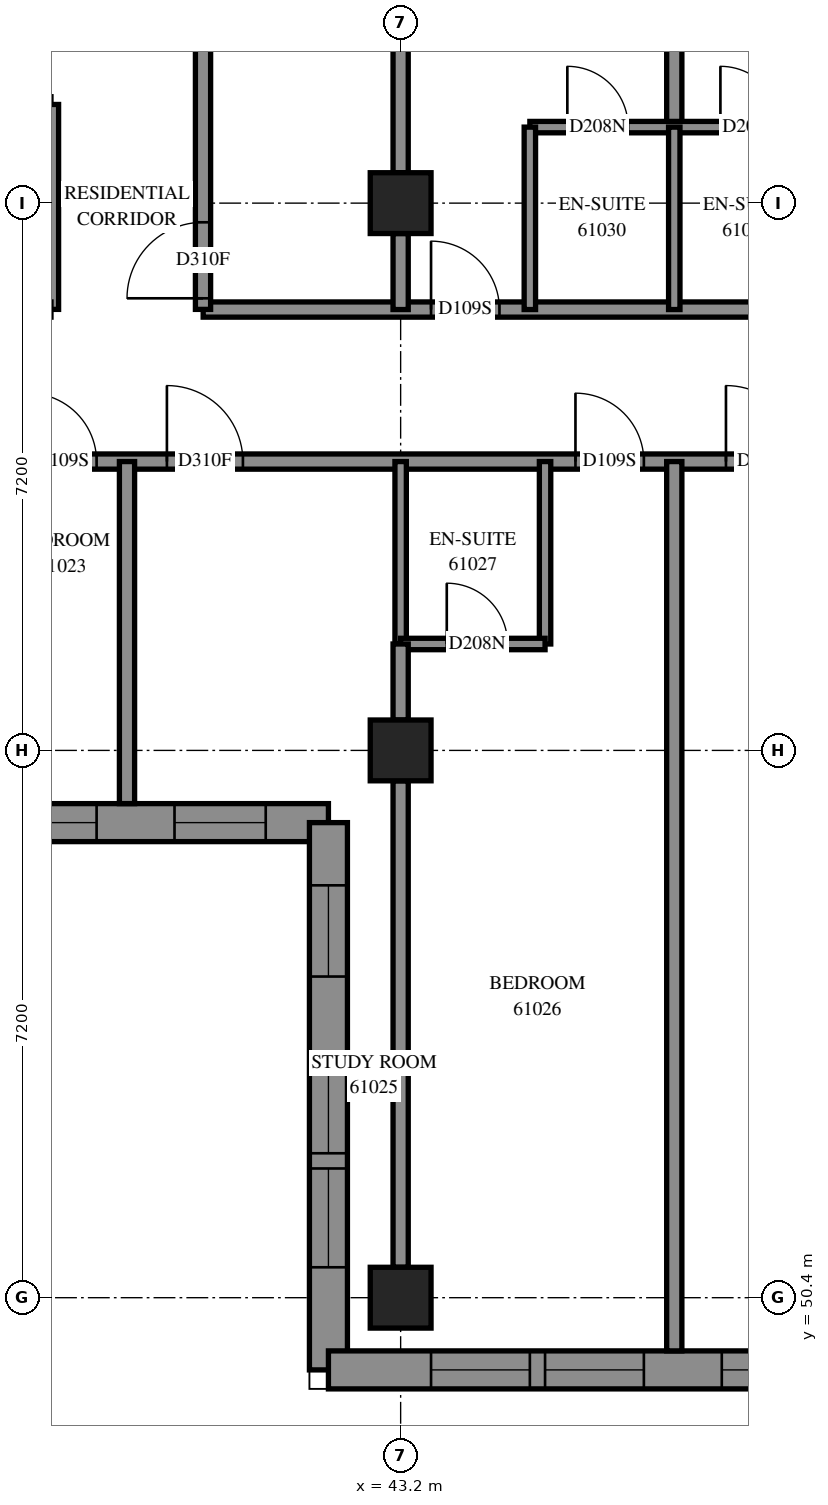
"""IFC4 building model, lengths in metres.
Left out: names, types, materials, properties, quantities, classifications, styles, units other than length and angle.
Written with IfcOpenShell. Run it as: python <this file> out.ifc"""

import sys

from ifc_helpers import new_model, si_unit, direction, frame, frame_2d, origin, origin_2d, place, context, subcontext, project, spatial, polyline, rectangle, outline, extrude, element, fill, save


model = new_model("IFC4")
c1 = context("Model", 3, precision=1e-05, world=origin(), true_north=direction((0.0, 1.0)))
c2 = subcontext(c1, "Body", "Model", "MODEL_VIEW")
j1 = project(units=[si_unit("LENGTHUNIT", "METRE"), si_unit("PLANEANGLEUNIT", "RADIAN")], contexts=[c1])
p1 = place(None, origin())
s1 = spatial("IfcSite", under=j1, at=p1, CompositionType="ELEMENT")
p2 = place(p1, origin())
s2 = spatial("IfcBuilding", under=s1, at=p2, CompositionType="ELEMENT")
p3 = place(p2, frame((0.0, 0.0, 223.6)))
s3 = spatial("IfcBuildingStorey", under=s2, at=p3, CompositionType="ELEMENT", Elevation=223.6)
for number, where, z_axis, x_axis in (
    (1, (43.2, 50.4, 0.0), (0.0, 0.0, 1.0), (1.0, 0.0, 0.0)),
    (2, (43.2, 57.6, 0.0), (0.0, 0.0, 1.0), (1.0, 0.0, 0.0)),
    (3, (43.2, 64.8, 0.0), (0.0, 0.0, 1.0), (1.0, 0.0, 0.0)),
):
    element("IfcColumn", number, at=place(p3, frame(where, z_axis=z_axis, x_axis=x_axis)), inside=s3, PredefinedType="COLUMN", context=c2, shape_type="SweptSolid", body=[
        extrude(rectangle(XDim=0.8, YDim=0.8, at=origin_2d()), origin(), (0.0, 0.0, 1.0), 3.1),
    ])
p4 = place(p3, frame((35.05, 56.65, 0.0), z_axis=(0.0, 0.0, 1.0), x_axis=(1.0, 0.0, 0.0)))
e4 = element("IfcWall", 4, at=p4, inside=s3, PredefinedType="SOLIDWALL", context=c2, shape_type="SweptSolid", body=[
    extrude(outline(polyline([(-0.25, -0.25), (6.95, -0.25), (7.45, 0.25), (0.25, 0.25), (-0.25, -0.25)])), origin(), (0.0, 0.0, 1.0), 3.1),
])
p5 = place(p4, frame((1.35, 0.0, 0.45)))
e5 = element("IfcOpeningElement", 5, at=p5, cuts=e4, PredefinedType="OPENING", context=c2, shape_type="SweptSolid", body=[
    extrude(rectangle(XDim=1.3, YDim=2.5, at=frame_2d((0.65, 1.25))), frame((0.0, 0.26, 0.0), z_axis=(0.0, -1.0, 0.0), x_axis=(1.0, 0.0, 0.0)), (0.0, 0.0, 1.0), 0.52),
])
p6 = place(p4, frame((2.85, 0.0, 0.45)))
e6 = element("IfcOpeningElement", 6, at=p6, cuts=e4, PredefinedType="OPENING", context=c2, shape_type="SweptSolid", body=[
    extrude(rectangle(XDim=1.3, YDim=2.5, at=frame_2d((0.65, 1.25))), frame((0.0, 0.26, 0.0), z_axis=(0.0, -1.0, 0.0), x_axis=(1.0, 0.0, 0.0)), (0.0, 0.0, 1.0), 0.52),
])
p7 = place(p4, frame((5.175, 0.0, 0.45)))
e7 = element("IfcOpeningElement", 7, at=p7, cuts=e4, PredefinedType="OPENING", context=c2, shape_type="SweptSolid", body=[
    extrude(rectangle(XDim=1.2, YDim=2.5, at=frame_2d((0.6, 1.25))), frame((0.0, 0.26, 0.0), z_axis=(0.0, -1.0, 0.0), x_axis=(1.0, 0.0, 0.0)), (0.0, 0.0, 1.0), 0.52),
])
p8 = place(p3, frame((42.25, 56.65, 0.0), z_axis=(0.0, 0.0, 1.0), x_axis=(0.0, -1.0, 0.0)))
e8 = element("IfcWall", 8, at=p8, inside=s3, PredefinedType="SOLIDWALL", context=c2, shape_type="SweptSolid", body=[
    extrude(outline(polyline([(0.25, -0.25), (7.45, -0.25), (6.95, 0.25), (-0.25, 0.25), (0.25, -0.25)])), origin(), (0.0, 0.0, 1.0), 3.1),
])
p9 = place(p8, frame((3.05, 0.0, 0.45)))
e9 = element("IfcOpeningElement", 9, at=p9, cuts=e8, PredefinedType="OPENING", context=c2, shape_type="SweptSolid", body=[
    extrude(rectangle(XDim=1.3, YDim=2.5, at=frame_2d((0.65, 1.25))), frame((0.0, 0.26, 0.0), z_axis=(0.0, -1.0, 0.0), x_axis=(1.0, 0.0, 0.0)), (0.0, 0.0, 1.0), 0.52),
])
p10 = place(p8, frame((4.55, 0.0, 0.45)))
e10 = element("IfcOpeningElement", 10, at=p10, cuts=e8, PredefinedType="OPENING", context=c2, shape_type="SweptSolid", body=[
    extrude(rectangle(XDim=1.3, YDim=2.5, at=frame_2d((0.65, 1.25))), frame((0.0, 0.26, 0.0), z_axis=(0.0, -1.0, 0.0), x_axis=(1.0, 0.0, 0.0)), (0.0, 0.0, 1.0), 0.52),
])
p11 = place(p8, frame((0.825, 0.0, 0.45)))
e11 = element("IfcOpeningElement", 11, at=p11, cuts=e8, PredefinedType="OPENING", context=c2, shape_type="SweptSolid", body=[
    extrude(rectangle(XDim=1.2, YDim=2.5, at=frame_2d((0.6, 1.25))), frame((0.0, 0.26, 0.0), z_axis=(0.0, -1.0, 0.0), x_axis=(1.0, 0.0, 0.0)), (0.0, 0.0, 1.0), 0.52),
])
p12 = place(p3, frame((42.25, 49.45, 0.0), z_axis=(0.0, 0.0, 1.0), x_axis=(1.0, 0.0, 0.0)))
e12 = element("IfcWall", 12, at=p12, inside=s3, PredefinedType="SOLIDWALL", context=c2, shape_type="SweptSolid", body=[
    extrude(outline(polyline([(-0.25, -0.25), (6.95, -0.25), (7.45, 0.25), (0.25, 0.25), (-0.25, -0.25)])), origin(), (0.0, 0.0, 1.0), 3.1),
])
p13 = place(p12, frame((1.35, 0.0, 0.45)))
e13 = element("IfcOpeningElement", 13, at=p13, cuts=e12, PredefinedType="OPENING", context=c2, shape_type="SweptSolid", body=[
    extrude(rectangle(XDim=1.3, YDim=2.5, at=frame_2d((0.65, 1.25))), frame((0.0, 0.26, 0.0), z_axis=(0.0, -1.0, 0.0), x_axis=(1.0, 0.0, 0.0)), (0.0, 0.0, 1.0), 0.52),
])
p14 = place(p12, frame((2.85, 0.0, 0.45)))
e14 = element("IfcOpeningElement", 14, at=p14, cuts=e12, PredefinedType="OPENING", context=c2, shape_type="SweptSolid", body=[
    extrude(rectangle(XDim=1.3, YDim=2.5, at=frame_2d((0.65, 1.25))), frame((0.0, 0.26, 0.0), z_axis=(0.0, -1.0, 0.0), x_axis=(1.0, 0.0, 0.0)), (0.0, 0.0, 1.0), 0.52),
])
p15 = place(p12, frame((5.175, 0.0, 0.45)))
e15 = element("IfcOpeningElement", 15, at=p15, cuts=e12, PredefinedType="OPENING", context=c2, shape_type="SweptSolid", body=[
    extrude(rectangle(XDim=1.2, YDim=2.5, at=frame_2d((0.6, 1.25))), frame((0.0, 0.26, 0.0), z_axis=(0.0, -1.0, 0.0), x_axis=(1.0, 0.0, 0.0)), (0.0, 0.0, 1.0), 0.52),
])
p16 = place(p3, frame((36.0, 61.4, 0.0), z_axis=(0.0, 0.0, 1.0), x_axis=(1.0, 0.0, 0.0)))
e16 = element("IfcWall", 16, at=p16, inside=s3, PredefinedType="PARTITIONING", context=c2, shape_type="SweptSolid", body=[
    extrude(rectangle(XDim=17.0, YDim=0.2, at=frame_2d((8.5, 0.0))), origin(), (0.0, 0.0, 1.0), 3.1),
])
p17 = place(p16, frame((2.3, 0.0, 0.0)))
e17 = element("IfcOpeningElement", 17, at=p17, cuts=e16, PredefinedType="OPENING", context=c2, shape_type="SweptSolid", body=[
    extrude(rectangle(XDim=0.9, YDim=2.1, at=frame_2d((0.45, 1.05))), frame((0.0, 0.11, 0.0), z_axis=(0.0, -1.0, 0.0), x_axis=(1.0, 0.0, 0.0)), (0.0, 0.0, 1.0), 0.22),
])
p18 = place(p16, frame((4.125, 0.0, 0.0)))
e18 = element("IfcOpeningElement", 18, at=p18, cuts=e16, PredefinedType="OPENING", context=c2, shape_type="SweptSolid", body=[
    extrude(rectangle(XDim=1.0, YDim=2.1, at=frame_2d((0.5, 1.05))), frame((0.0, 0.11, 0.0), z_axis=(0.0, -1.0, 0.0), x_axis=(1.0, 0.0, 0.0)), (0.0, 0.0, 1.0), 0.22),
])
p19 = place(p16, frame((9.5, 0.0, 0.0)))
e19 = element("IfcOpeningElement", 19, at=p19, cuts=e16, PredefinedType="OPENING", context=c2, shape_type="SweptSolid", body=[
    extrude(rectangle(XDim=0.9, YDim=2.1, at=frame_2d((0.45, 1.05))), frame((0.0, 0.11, 0.0), z_axis=(0.0, -1.0, 0.0), x_axis=(1.0, 0.0, 0.0)), (0.0, 0.0, 1.0), 0.22),
])
p20 = place(p16, frame((11.48, 0.0, 0.0)))
e20 = element("IfcOpeningElement", 20, at=p20, cuts=e16, PredefinedType="OPENING", context=c2, shape_type="SweptSolid", body=[
    extrude(rectangle(XDim=1.0, YDim=2.1, at=frame_2d((0.5, 1.05))), frame((0.0, 0.11, 0.0), z_axis=(0.0, -1.0, 0.0), x_axis=(1.0, 0.0, 0.0)), (0.0, 0.0, 1.0), 0.22),
])
p21 = place(p16, frame((15.805, 0.0, 0.0)))
e21 = element("IfcOpeningElement", 21, at=p21, cuts=e16, PredefinedType="OPENING", context=c2, shape_type="SweptSolid", body=[
    extrude(rectangle(XDim=1.0, YDim=2.1, at=frame_2d((0.5, 1.05))), frame((0.0, 0.11, 0.0), z_axis=(0.0, -1.0, 0.0), x_axis=(1.0, 0.0, 0.0)), (0.0, 0.0, 1.0), 0.22),
])
p22 = place(p3, frame((40.602, 63.4, 0.0), z_axis=(0.0, 0.0, 1.0), x_axis=(1.0, 0.0, 0.0)))
e22 = element("IfcWall", 22, at=p22, inside=s3, PredefinedType="PARTITIONING", context=c2, shape_type="SweptSolid", body=[
    extrude(rectangle(XDim=14.398, YDim=0.2, at=frame_2d((7.199, 0.0))), origin(), (0.0, 0.0, 1.0), 3.1),
])
p23 = place(p22, frame((2.998, 0.0, 0.0)))
e23 = element("IfcOpeningElement", 23, at=p23, cuts=e22, PredefinedType="OPENING", context=c2, shape_type="SweptSolid", body=[
    extrude(rectangle(XDim=0.9, YDim=2.1, at=frame_2d((0.45, 1.05))), frame((0.0, 0.11, 0.0), z_axis=(0.0, -1.0, 0.0), x_axis=(1.0, 0.0, 0.0)), (0.0, 0.0, 1.0), 0.22),
])
p24 = place(p22, frame((8.498, 0.0, 0.0)))
e24 = element("IfcOpeningElement", 24, at=p24, cuts=e22, PredefinedType="OPENING", context=c2, shape_type="SweptSolid", body=[
    extrude(rectangle(XDim=0.9, YDim=2.1, at=frame_2d((0.45, 1.05))), frame((0.0, 0.11, 0.0), z_axis=(0.0, -1.0, 0.0), x_axis=(1.0, 0.0, 0.0)), (0.0, 0.0, 1.0), 0.22),
])
p25 = place(p22, frame((10.198, 0.0, 0.0)))
e25 = element("IfcOpeningElement", 25, at=p25, cuts=e22, PredefinedType="OPENING", context=c2, shape_type="SweptSolid", body=[
    extrude(rectangle(XDim=0.9, YDim=2.1, at=frame_2d((0.45, 1.05))), frame((0.0, 0.11, 0.0), z_axis=(0.0, -1.0, 0.0), x_axis=(1.0, 0.0, 0.0)), (0.0, 0.0, 1.0), 0.22),
])
p26 = place(p3, frame((46.8, 49.7, 0.0), z_axis=(0.0, 0.0, 1.0), x_axis=(0.0, 1.0, 0.0)))
e26 = element("IfcWall", 26, at=p26, inside=s3, PredefinedType="PARTITIONING", context=c2, shape_type="SweptSolid", body=[
    extrude(rectangle(XDim=11.7, YDim=0.2, at=frame_2d((5.85, 0.0))), origin(), (0.0, 0.0, 1.0), 3.1),
])
p27 = place(p3, frame((46.8, 65.8, 0.0), z_axis=(0.0, 0.0, 1.0), x_axis=(0.0, 1.0, 0.0)))
e27 = element("IfcWall", 27, at=p27, inside=s3, PredefinedType="PARTITIONING", context=c2, shape_type="SweptSolid", body=[
    extrude(rectangle(XDim=7.08, YDim=0.2, at=frame_2d((3.54, 0.0))), origin(), (0.0, 0.0, 1.0), 3.1),
])
p28 = place(p3, frame((43.2, 50.8, 0.0), z_axis=(0.0, 0.0, 1.0), x_axis=(0.0, 1.0, 0.0)))
e28 = element("IfcWall", 28, at=p28, inside=s3, PredefinedType="PARTITIONING", context=c2, shape_type="SweptSolid", body=[
    extrude(rectangle(XDim=6.4, YDim=0.2, at=frame_2d((3.2, 0.0))), origin(), (0.0, 0.0, 1.0), 2.6),
])
p29 = place(p3, frame((43.2, 65.2, 0.0), z_axis=(0.0, 0.0, 1.0), x_axis=(0.0, 1.0, 0.0)))
e29 = element("IfcWall", 29, at=p29, inside=s3, PredefinedType="PARTITIONING", context=c2, shape_type="SweptSolid", body=[
    extrude(rectangle(XDim=6.4, YDim=0.2, at=frame_2d((3.2, 0.0))), origin(), (0.0, 0.0, 1.0), 3.1),
])
p30 = place(p3, frame((40.6, 63.402, 0.0), z_axis=(0.0, 0.0, 1.0), x_axis=(0.0, 1.0, 0.0)))
e30 = element("IfcWall", 30, at=p30, inside=s3, PredefinedType="PARTITIONING", context=c2, shape_type="SweptSolid", body=[
    extrude(rectangle(XDim=4.698, YDim=0.2, at=frame_2d((2.349, 0.0))), origin(), (0.0, 0.0, 1.0), 3.1),
])
p31 = place(p30, frame((0.146, 0.0, 0.0)))
e31 = element("IfcOpeningElement", 31, at=p31, cuts=e30, PredefinedType="OPENING", context=c2, shape_type="SweptSolid", body=[
    extrude(rectangle(XDim=1.0, YDim=2.1, at=frame_2d((0.5, 1.05))), frame((0.0, 0.11, 0.0), z_axis=(0.0, -1.0, 0.0), x_axis=(1.0, 0.0, 0.0)), (0.0, 0.0, 1.0), 0.22),
])
p32 = place(p3, frame((39.6, 56.9, 0.0), z_axis=(0.0, 0.0, 1.0), x_axis=(0.0, 1.0, 0.0)))
e32 = element("IfcWall", 32, at=p32, inside=s3, PredefinedType="PARTITIONING", context=c2, shape_type="SweptSolid", body=[
    extrude(rectangle(XDim=4.5, YDim=0.2, at=frame_2d((2.25, 0.0))), origin(), (0.0, 0.0, 1.0), 3.1),
])
p33 = place(p3, frame((44.9, 65.8, 0.0), z_axis=(0.0, 0.0, 1.0), x_axis=(1.0, 0.0, 0.0)))
e33 = element("IfcWall", 33, at=p33, inside=s3, PredefinedType="PARTITIONING", context=c2, shape_type="SweptSolid", body=[
    extrude(rectangle(XDim=3.8, YDim=0.15, at=frame_2d((1.9, 0.0))), origin(), (0.0, 0.0, 1.0), 3.1),
])
p34 = place(p33, frame((0.493, 0.0, 0.0)))
e34 = element("IfcOpeningElement", 34, at=p34, cuts=e33, PredefinedType="OPENING", context=c2, shape_type="SweptSolid", body=[
    extrude(rectangle(XDim=0.8, YDim=2.1, at=frame_2d((0.4, 1.05))), frame((0.0, 0.085, 0.0), z_axis=(0.0, -1.0, 0.0), x_axis=(1.0, 0.0, 0.0)), (0.0, 0.0, 1.0), 0.17),
])
p35 = place(p33, frame((2.507, 0.0, 0.0)))
e35 = element("IfcOpeningElement", 35, at=p35, cuts=e33, PredefinedType="OPENING", context=c2, shape_type="SweptSolid", body=[
    extrude(rectangle(XDim=0.8, YDim=2.1, at=frame_2d((0.4, 1.05))), frame((0.0, 0.085, 0.0), z_axis=(0.0, -1.0, 0.0), x_axis=(1.0, 0.0, 0.0)), (0.0, 0.0, 1.0), 0.17),
])
p36 = place(p3, frame((38.6, 63.402, 0.0), z_axis=(0.0, 0.0, 1.0), x_axis=(0.0, 1.0, 0.0)))
e36 = element("IfcWall", 36, at=p36, inside=s3, PredefinedType="PARTITIONING", context=c2, shape_type="SweptSolid", body=[
    extrude(rectangle(XDim=2.696, YDim=0.2, at=frame_2d((1.348, 0.0))), origin(), (0.0, 0.0, 1.0), 3.1),
])
for number, where, z_axis, x_axis in (
    (37, (45.1, 59.0, 0.0), (0.0, 0.0, 1.0), (0.0, 1.0, 0.0)),
    (38, (43.2, 59.0, 0.0), (0.0, 0.0, 1.0), (0.0, 1.0, 0.0)),
    (39, (44.9, 63.4, 0.0), (0.0, 0.0, 1.0), (0.0, 1.0, 0.0)),
    (40, (46.8, 63.4, 0.0), (0.0, 0.0, 1.0), (0.0, 1.0, 0.0)),
):
    element("IfcWall", number, at=place(p3, frame(where, z_axis=z_axis, x_axis=x_axis)), inside=s3, PredefinedType="PARTITIONING", context=c2, shape_type="SweptSolid", body=[
        extrude(rectangle(XDim=2.4, YDim=0.15, at=frame_2d((1.2, 0.0))), origin(), (0.0, 0.0, 1.0), 3.1),
    ])
p37 = place(p3, frame((43.2, 59.0, 0.0), z_axis=(0.0, 0.0, 1.0), x_axis=(1.0, 0.0, 0.0)))
e41 = element("IfcWall", 41, at=p37, inside=s3, PredefinedType="PARTITIONING", context=c2, shape_type="SweptSolid", body=[
    extrude(rectangle(XDim=1.9, YDim=0.15, at=frame_2d((0.95, 0.0))), origin(), (0.0, 0.0, 1.0), 3.1),
])
p38 = place(p37, frame((0.607, 0.0, 0.0)))
e42 = element("IfcOpeningElement", 42, at=p38, cuts=e41, PredefinedType="OPENING", context=c2, shape_type="SweptSolid", body=[
    extrude(rectangle(XDim=0.8, YDim=2.1, at=frame_2d((0.4, 1.05))), frame((0.0, 0.085, 0.0), z_axis=(0.0, -1.0, 0.0), x_axis=(1.0, 0.0, 0.0)), (0.0, 0.0, 1.0), 0.17),
])
for number, where, z_axis, x_axis in (
    (43, (43.2, 63.4, 0.0), (0.0, 0.0, 1.0), (0.0, 1.0, 0.0)),
    (44, (43.2, 58.0, 0.0), (0.0, 0.0, 1.0), (0.0, 1.0, 0.0)),
):
    element("IfcWall", number, at=place(p3, frame(where, z_axis=z_axis, x_axis=x_axis)), inside=s3, PredefinedType="PARTITIONING", context=c2, shape_type="SweptSolid", body=[
        extrude(rectangle(XDim=1.0, YDim=0.2, at=frame_2d((0.5, 0.0))), origin(), (0.0, 0.0, 1.0), 3.1),
    ])
p39 = place(p6, origin())
e45 = element("IfcWindow", 45, at=p39, inside=s3, PartitioningType="SINGLE_PANEL", PredefinedType="WINDOW", context=c2, shape_type="SweptSolid", body=[
    extrude(rectangle(XDim=1.3, YDim=2.5, at=frame_2d((0.65, 1.25))), frame((0.0, 0.18, 0.0), z_axis=(0.0, -1.0, 0.0), x_axis=(1.0, 0.0, 0.0)), (0.0, 0.0, 1.0), 0.06),
])
fill(e6, e45)
p40 = place(p7, origin())
e46 = element("IfcWindow", 46, at=p40, inside=s3, PartitioningType="SINGLE_PANEL", PredefinedType="WINDOW", context=c2, shape_type="SweptSolid", body=[
    extrude(rectangle(XDim=1.2, YDim=2.5, at=frame_2d((0.6, 1.25))), frame((0.0, 0.18, 0.0), z_axis=(0.0, -1.0, 0.0), x_axis=(1.0, 0.0, 0.0)), (0.0, 0.0, 1.0), 0.06),
])
fill(e7, e46)
p41 = place(p9, origin())
e47 = element("IfcWindow", 47, at=p41, inside=s3, PartitioningType="SINGLE_PANEL", PredefinedType="WINDOW", context=c2, shape_type="SweptSolid", body=[
    extrude(rectangle(XDim=1.3, YDim=2.5, at=frame_2d((0.65, 1.25))), frame((0.0, 0.18, 0.0), z_axis=(0.0, -1.0, 0.0), x_axis=(1.0, 0.0, 0.0)), (0.0, 0.0, 1.0), 0.06),
])
fill(e9, e47)
p42 = place(p10, origin())
e48 = element("IfcWindow", 48, at=p42, inside=s3, PartitioningType="SINGLE_PANEL", PredefinedType="WINDOW", context=c2, shape_type="SweptSolid", body=[
    extrude(rectangle(XDim=1.3, YDim=2.5, at=frame_2d((0.65, 1.25))), frame((0.0, 0.18, 0.0), z_axis=(0.0, -1.0, 0.0), x_axis=(1.0, 0.0, 0.0)), (0.0, 0.0, 1.0), 0.06),
])
fill(e10, e48)
p43 = place(p11, origin())
e49 = element("IfcWindow", 49, at=p43, inside=s3, PartitioningType="SINGLE_PANEL", PredefinedType="WINDOW", context=c2, shape_type="SweptSolid", body=[
    extrude(rectangle(XDim=1.2, YDim=2.5, at=frame_2d((0.6, 1.25))), frame((0.0, 0.18, 0.0), z_axis=(0.0, -1.0, 0.0), x_axis=(1.0, 0.0, 0.0)), (0.0, 0.0, 1.0), 0.06),
])
fill(e11, e49)
p44 = place(p13, origin())
e50 = element("IfcWindow", 50, at=p44, inside=s3, PartitioningType="SINGLE_PANEL", PredefinedType="WINDOW", context=c2, shape_type="SweptSolid", body=[
    extrude(rectangle(XDim=1.3, YDim=2.5, at=frame_2d((0.65, 1.25))), frame((0.0, 0.18, 0.0), z_axis=(0.0, -1.0, 0.0), x_axis=(1.0, 0.0, 0.0)), (0.0, 0.0, 1.0), 0.06),
])
fill(e13, e50)
p45 = place(p14, origin())
e51 = element("IfcWindow", 51, at=p45, inside=s3, PartitioningType="SINGLE_PANEL", PredefinedType="WINDOW", context=c2, shape_type="SweptSolid", body=[
    extrude(rectangle(XDim=1.3, YDim=2.5, at=frame_2d((0.65, 1.25))), frame((0.0, 0.18, 0.0), z_axis=(0.0, -1.0, 0.0), x_axis=(1.0, 0.0, 0.0)), (0.0, 0.0, 1.0), 0.06),
])
fill(e14, e51)
p46 = place(p15, origin())
e52 = element("IfcWindow", 52, at=p46, inside=s3, PartitioningType="SINGLE_PANEL", PredefinedType="WINDOW", context=c2, shape_type="SweptSolid", body=[
    extrude(rectangle(XDim=1.2, YDim=2.5, at=frame_2d((0.6, 1.25))), frame((0.0, 0.18, 0.0), z_axis=(0.0, -1.0, 0.0), x_axis=(1.0, 0.0, 0.0)), (0.0, 0.0, 1.0), 0.06),
])
fill(e15, e52)
p47 = place(p17, origin())
e53 = element("IfcDoor", 53, at=p47, inside=s3, OperationType="SINGLE_SWING_LEFT", PredefinedType="DOOR", context=c2, shape_type="SweptSolid", body=[
    extrude(rectangle(XDim=0.9, YDim=2.1, at=frame_2d((0.45, 1.05))), frame((0.0, 0.025, 0.0), z_axis=(0.0, -1.0, 0.0), x_axis=(1.0, 0.0, 0.0)), (0.0, 0.0, 1.0), 0.05),
])
fill(e17, e53)
p48 = place(p18, origin())
e54 = element("IfcDoor", 54, at=p48, inside=s3, OperationType="SINGLE_SWING_RIGHT", PredefinedType="DOOR", context=c2, shape_type="SweptSolid", body=[
    extrude(rectangle(XDim=1.0, YDim=2.1, at=frame_2d((0.5, 1.05))), frame((0.0, 0.025, 0.0), z_axis=(0.0, -1.0, 0.0), x_axis=(1.0, 0.0, 0.0)), (0.0, 0.0, 1.0), 0.05),
])
fill(e18, e54)
p49 = place(p19, origin())
e55 = element("IfcDoor", 55, at=p49, inside=s3, OperationType="SINGLE_SWING_LEFT", PredefinedType="DOOR", context=c2, shape_type="SweptSolid", body=[
    extrude(rectangle(XDim=0.9, YDim=2.1, at=frame_2d((0.45, 1.05))), frame((0.0, 0.025, 0.0), z_axis=(0.0, -1.0, 0.0), x_axis=(1.0, 0.0, 0.0)), (0.0, 0.0, 1.0), 0.05),
])
fill(e19, e55)
p50 = place(p38, origin())
e56 = element("IfcDoor", 56, at=p50, inside=s3, OperationType="SINGLE_SWING_RIGHT", PredefinedType="DOOR", context=c2, shape_type="SweptSolid", body=[
    extrude(rectangle(XDim=0.8, YDim=2.1, at=frame_2d((0.4, 1.05))), frame((0.0, 0.025, 0.0), z_axis=(0.0, -1.0, 0.0), x_axis=(1.0, 0.0, 0.0)), (0.0, 0.0, 1.0), 0.05),
])
fill(e42, e56)
p51 = place(p31, origin())
e57 = element("IfcDoor", 57, at=p51, inside=s3, OperationType="SINGLE_SWING_LEFT", PredefinedType="DOOR", context=c2, shape_type="SweptSolid", body=[
    extrude(rectangle(XDim=1.0, YDim=2.1, at=frame_2d((0.5, 1.05))), frame((0.0, 0.025, 0.0), z_axis=(0.0, -1.0, 0.0), x_axis=(1.0, 0.0, 0.0)), (0.0, 0.0, 1.0), 0.05),
])
fill(e31, e57)
p52 = place(p23, origin())
e58 = element("IfcDoor", 58, at=p52, inside=s3, OperationType="SINGLE_SWING_RIGHT", PredefinedType="DOOR", context=c2, shape_type="SweptSolid", body=[
    extrude(rectangle(XDim=0.9, YDim=2.1, at=frame_2d((0.45, 1.05))), frame((0.0, 0.025, 0.0), z_axis=(0.0, -1.0, 0.0), x_axis=(1.0, 0.0, 0.0)), (0.0, 0.0, 1.0), 0.05),
])
fill(e23, e58)
p53 = place(p34, origin())
e59 = element("IfcDoor", 59, at=p53, inside=s3, OperationType="SINGLE_SWING_RIGHT", PredefinedType="DOOR", context=c2, shape_type="SweptSolid", body=[
    extrude(rectangle(XDim=0.8, YDim=2.1, at=frame_2d((0.4, 1.05))), frame((0.0, 0.025, 0.0), z_axis=(0.0, -1.0, 0.0), x_axis=(1.0, 0.0, 0.0)), (0.0, 0.0, 1.0), 0.05),
])
fill(e34, e59)
p54 = place(p35, origin())
e60 = element("IfcDoor", 60, at=p54, inside=s3, OperationType="SINGLE_SWING_RIGHT", PredefinedType="DOOR", context=c2, shape_type="SweptSolid", body=[
    extrude(rectangle(XDim=0.8, YDim=2.1, at=frame_2d((0.4, 1.05))), frame((0.0, 0.025, 0.0), z_axis=(0.0, -1.0, 0.0), x_axis=(1.0, 0.0, 0.0)), (0.0, 0.0, 1.0), 0.05),
])
fill(e35, e60)
p55 = place(p20, origin())
e61 = element("IfcDoor", 61, at=p55, inside=s3, OperationType="SINGLE_SWING_RIGHT", PredefinedType="DOOR", context=c2, shape_type="SweptSolid", body=[
    extrude(rectangle(XDim=1.0, YDim=2.1, at=frame_2d((0.5, 1.05))), frame((0.0, 0.025, 0.0), z_axis=(0.0, -1.0, 0.0), x_axis=(1.0, 0.0, 0.0)), (0.0, 0.0, 1.0), 0.05),
])
fill(e20, e61)
save(model, sys.argv[1])
